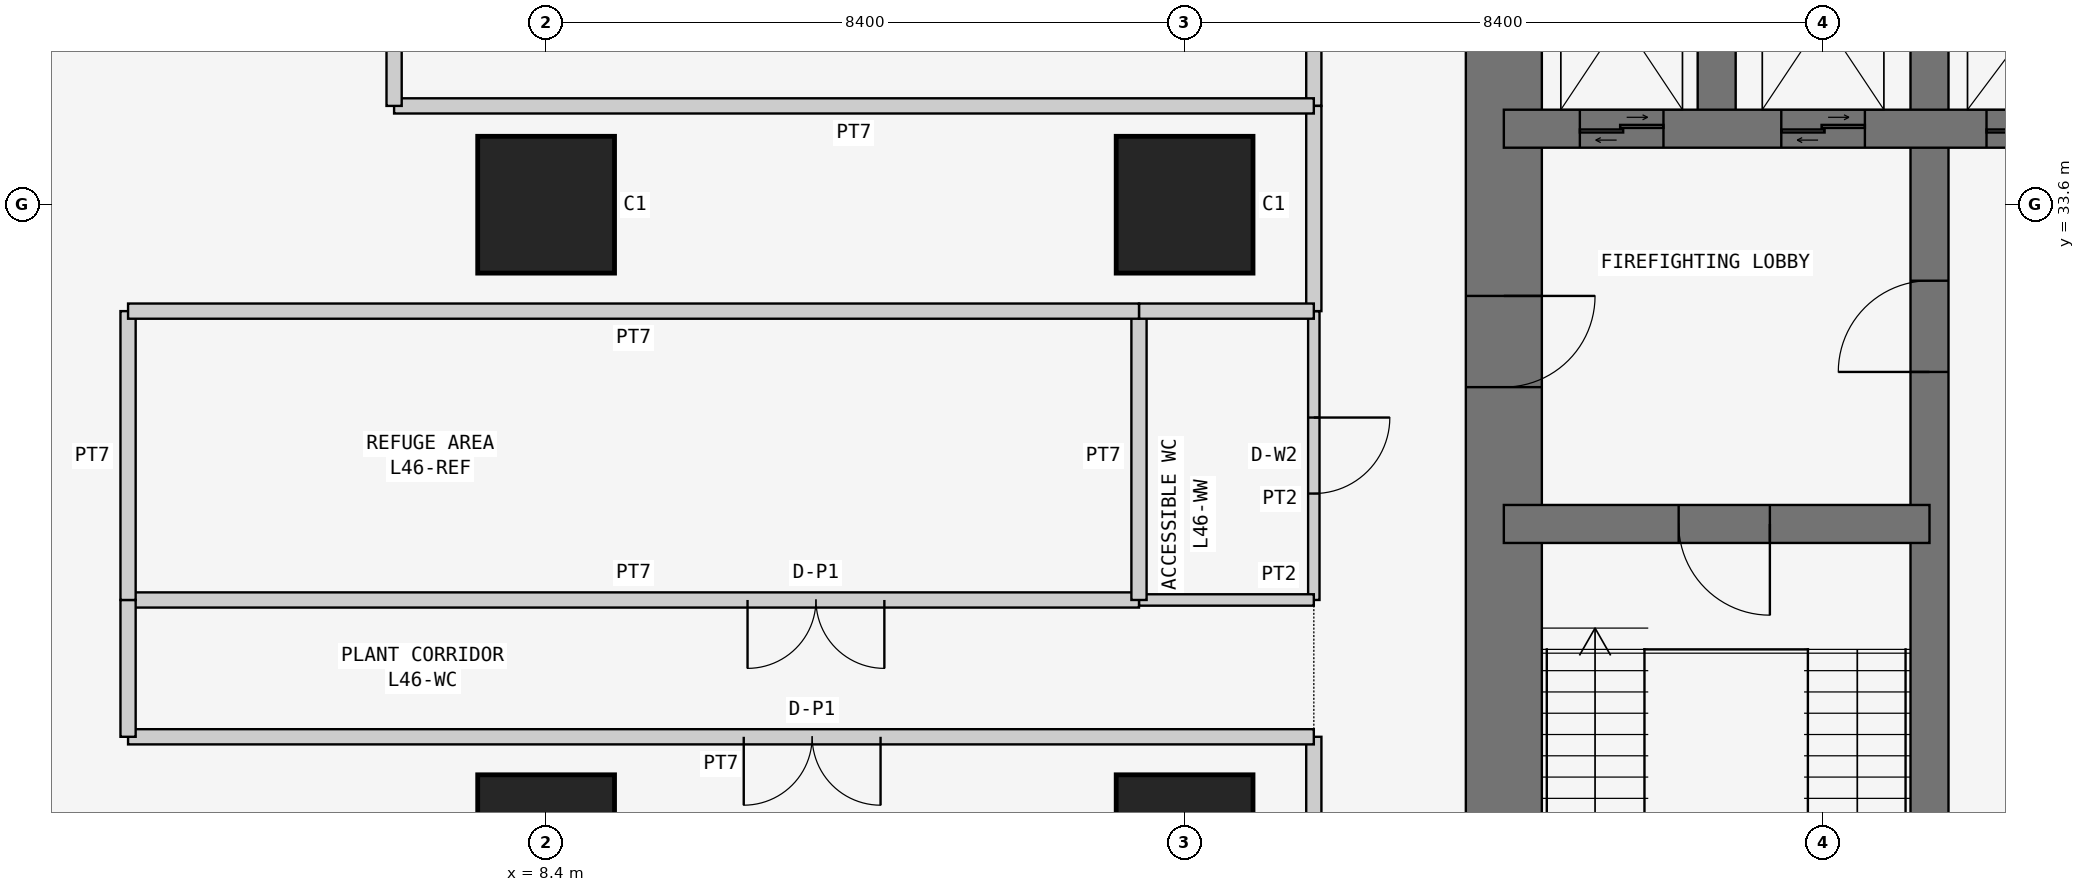
"""IFC4 building model, lengths in metres.
Left out: names, types, materials, properties, quantities, classifications, styles, units other than length and angle.
Written with IfcOpenShell. Run it as: python <this file> out.ifc"""

import sys

from ifc_helpers import new_model, si_unit, direction, frame, frame_2d, origin, origin_2d, place, context, subcontext, project, spatial, rectangle, extrude, element, fill, save


model = new_model("IFC4")
c1 = context("Model", 3, precision=1e-05, world=origin(), true_north=direction((0.0, 1.0)))
c2 = subcontext(c1, "Body", "Model", "MODEL_VIEW")
j1 = project(units=[si_unit("LENGTHUNIT", "METRE"), si_unit("PLANEANGLEUNIT", "RADIAN")], contexts=[c1])
p1 = place(None, origin())
s1 = spatial("IfcSite", under=j1, at=p1, CompositionType="ELEMENT")
p2 = place(p1, origin())
s2 = spatial("IfcBuilding", under=s1, at=p2, CompositionType="ELEMENT")
p3 = place(p2, frame((0.0, 0.0, 177.3)))
s3 = spatial("IfcBuildingStorey", under=s2, at=p3, CompositionType="ELEMENT", Elevation=177.3)
for number, where, z_axis, x_axis in (
    (1, (8.4, 25.2, 0.0), (0.0, 0.0, 1.0), (1.0, 0.0, 0.0)),
    (2, (8.4, 33.6, 0.0), (0.0, 0.0, 1.0), (1.0, 0.0, 0.0)),
    (3, (16.8, 25.2, 0.0), (0.0, 0.0, 1.0), (1.0, 0.0, 0.0)),
    (4, (16.8, 33.6, 0.0), (0.0, 0.0, 1.0), (1.0, 0.0, 0.0)),
):
    element("IfcColumn", number, at=place(p3, frame(where, z_axis=z_axis, x_axis=x_axis)), inside=s3, PredefinedType="COLUMN", context=c2, shape_type="SweptSolid", body=[
        extrude(rectangle(XDim=1.8, YDim=1.8, at=origin_2d()), origin(), (0.0, 0.0, 1.0), 6.0),
    ])
p4 = place(p3, frame((21.0, 37.8, 0.0), z_axis=(0.0, 0.0, 1.0), x_axis=(0.0, -1.0, 0.0)))
e5 = element("IfcWall", 5, at=p4, inside=s3, PredefinedType="SHEAR", context=c2, shape_type="SweptSolid", body=[
    extrude(rectangle(XDim=17.3, YDim=1.0, at=frame_2d((8.65, 0.0))), origin(), (0.0, 0.0, 1.0), 6.0),
])
p5 = place(p4, frame((5.4, 0.0, 0.0)))
e6 = element("IfcOpeningElement", 6, at=p5, cuts=e5, PredefinedType="OPENING", context=c2, shape_type="SweptSolid", body=[
    extrude(rectangle(XDim=1.2, YDim=2.1, at=frame_2d((0.6, 1.05))), frame((0.0, 0.51, 0.0), z_axis=(0.0, -1.0, 0.0), x_axis=(1.0, 0.0, 0.0)), (0.0, 0.0, 1.0), 1.02),
])
p6 = place(p3, frame((26.6, 21.0, 0.0), z_axis=(0.0, 0.0, 1.0), x_axis=(0.0, 1.0, 0.0)))
e7 = element("IfcWall", 7, at=p6, inside=s3, PredefinedType="SHEAR", context=c2, shape_type="SweptSolid", body=[
    extrude(rectangle(XDim=16.8, YDim=0.5, at=frame_2d((8.4, 0.0))), origin(), (0.0, 0.0, 1.0), 6.0),
])
p7 = place(p6, frame((10.4, 0.0, 0.0)))
e8 = element("IfcOpeningElement", 8, at=p7, cuts=e7, PredefinedType="OPENING", context=c2, shape_type="SweptSolid", body=[
    extrude(rectangle(XDim=1.2, YDim=2.1, at=frame_2d((0.6, 1.05))), frame((0.0, 0.26, 0.0), z_axis=(0.0, -1.0, 0.0), x_axis=(1.0, 0.0, 0.0)), (0.0, 0.0, 1.0), 0.52),
])
p8 = place(p3, frame((21.0, 29.4, 0.0), z_axis=(0.0, 0.0, 1.0), x_axis=(1.0, 0.0, 0.0)))
e9 = element("IfcWall", 9, at=p8, inside=s3, PredefinedType="SHEAR", context=c2, shape_type="SweptSolid", body=[
    extrude(rectangle(XDim=5.6, YDim=0.5, at=frame_2d((2.8, 0.0))), origin(), (0.0, 0.0, 1.0), 6.0),
])
p9 = place(p8, frame((2.3, 0.0, 0.0)))
e10 = element("IfcOpeningElement", 10, at=p9, cuts=e9, PredefinedType="OPENING", context=c2, shape_type="SweptSolid", body=[
    extrude(rectangle(XDim=1.2, YDim=2.1, at=frame_2d((0.6, 1.05))), frame((0.0, 0.26, 0.0), z_axis=(0.0, -1.0, 0.0), x_axis=(1.0, 0.0, 0.0)), (0.0, 0.0, 1.0), 0.52),
])
p10 = place(p3, frame((21.0, 34.6, 0.0), z_axis=(0.0, 0.0, 1.0), x_axis=(1.0, 0.0, 0.0)))
e11 = element("IfcWall", 11, at=p10, inside=s3, PredefinedType="SHEAR", context=c2, shape_type="SweptSolid", body=[
    extrude(rectangle(XDim=11.2, YDim=0.5, at=frame_2d((5.6, 0.0))), origin(), (0.0, 0.0, 1.0), 6.0),
])
p11 = place(p10, frame((1.0, 0.0, 0.0)))
e12 = element("IfcOpeningElement", 12, at=p11, cuts=e11, PredefinedType="OPENING", context=c2, shape_type="SweptSolid", body=[
    extrude(rectangle(XDim=1.1, YDim=2.1, at=frame_2d((0.55, 1.05))), frame((0.0, 0.26, 0.0), z_axis=(0.0, -1.0, 0.0), x_axis=(1.0, 0.0, 0.0)), (0.0, 0.0, 1.0), 0.52),
])
p12 = place(p10, frame((3.65, 0.0, 0.0)))
e13 = element("IfcOpeningElement", 13, at=p12, cuts=e11, PredefinedType="OPENING", context=c2, shape_type="SweptSolid", body=[
    extrude(rectangle(XDim=1.1, YDim=2.1, at=frame_2d((0.55, 1.05))), frame((0.0, 0.26, 0.0), z_axis=(0.0, -1.0, 0.0), x_axis=(1.0, 0.0, 0.0)), (0.0, 0.0, 1.0), 0.52),
])
p13 = place(p10, frame((6.35, 0.0, 0.0)))
e14 = element("IfcOpeningElement", 14, at=p13, cuts=e11, PredefinedType="OPENING", context=c2, shape_type="SweptSolid", body=[
    extrude(rectangle(XDim=1.3, YDim=2.1, at=frame_2d((0.65, 1.05))), frame((0.0, 0.26, 0.0), z_axis=(0.0, -1.0, 0.0), x_axis=(1.0, 0.0, 0.0)), (0.0, 0.0, 1.0), 0.52),
])
p14 = place(p3, frame((23.8, 34.6, 0.0), z_axis=(0.0, 0.0, 1.0), x_axis=(0.0, 1.0, 0.0)))
e15 = element("IfcWall", 15, at=p14, inside=s3, PredefinedType="SHEAR", context=c2, shape_type="SweptSolid", body=[
    extrude(rectangle(XDim=3.2, YDim=0.5, at=frame_2d((1.6, 0.0))), origin(), (0.0, 0.0, 1.0), 6.0),
])
p15 = place(p3, frame((18.5, 34.9, 0.0), z_axis=(0.0, 0.0, 1.0), x_axis=(0.0, 1.0, 0.0)))
e16 = element("IfcWall", 16, at=p15, inside=s3, PredefinedType="PARTITIONING", context=c2, shape_type="SweptSolid", body=[
    extrude(rectangle(XDim=5.4, YDim=0.2, at=frame_2d((2.7, 0.0))), origin(), (0.0, 0.0, 1.0), 5.85),
])
p16 = place(p15, frame((1.8, 0.0, 0.0)))
e17 = element("IfcOpeningElement", 17, at=p16, cuts=e16, PredefinedType="OPENING", context=c2, shape_type="SweptSolid", body=[
    extrude(rectangle(XDim=1.8, YDim=2.4, at=frame_2d((0.9, 1.2))), frame((0.0, 0.11, 0.0), z_axis=(0.0, -1.0, 0.0), x_axis=(1.0, 0.0, 0.0)), (0.0, 0.0, 1.0), 0.22),
])
p17 = place(p3, frame((18.5, 28.4, 0.0), z_axis=(0.0, 0.0, 1.0), x_axis=(0.0, 1.0, 0.0)))
e18 = element("IfcWall", 18, at=p17, inside=s3, PredefinedType="PARTITIONING", context=c2, shape_type="SweptSolid", body=[
    extrude(rectangle(XDim=3.8, YDim=0.15, at=frame_2d((1.9, 0.0))), origin(), (0.0, 0.0, 1.0), 5.85),
])
p18 = place(p17, frame((1.4, 0.0, 0.0)))
e19 = element("IfcOpeningElement", 19, at=p18, cuts=e18, PredefinedType="OPENING", context=c2, shape_type="SweptSolid", body=[
    extrude(rectangle(XDim=1.0, YDim=2.1, at=frame_2d((0.5, 1.05))), frame((0.0, 0.085, 0.0), z_axis=(0.0, -1.0, 0.0), x_axis=(1.0, 0.0, 0.0)), (0.0, 0.0, 1.0), 0.17),
])
p19 = place(p3, frame((18.5, 23.9, 0.0), z_axis=(0.0, 0.0, 1.0), x_axis=(0.0, 1.0, 0.0)))
e20 = element("IfcWall", 20, at=p19, inside=s3, PredefinedType="PARTITIONING", context=c2, shape_type="SweptSolid", body=[
    extrude(rectangle(XDim=2.7, YDim=0.2, at=frame_2d((1.35, 0.0))), origin(), (0.0, 0.0, 1.0), 5.85),
])
p20 = place(p3, frame((18.5, 32.2, 0.0), z_axis=(0.0, 0.0, 1.0), x_axis=(0.0, 1.0, 0.0)))
e21 = element("IfcWall", 21, at=p20, inside=s3, PredefinedType="PARTITIONING", context=c2, shape_type="SweptSolid", body=[
    extrude(rectangle(XDim=2.7, YDim=0.2, at=frame_2d((1.35, 0.0))), origin(), (0.0, 0.0, 1.0), 5.85),
])
p21 = place(p3, frame((18.5, 34.9, 0.0), z_axis=(0.0, 0.0, 1.0), x_axis=(-1.0, 0.0, 0.0)))
e22 = element("IfcWall", 22, at=p21, inside=s3, PredefinedType="PARTITIONING", context=c2, shape_type="SweptSolid", body=[
    extrude(rectangle(XDim=12.1, YDim=0.2, at=frame_2d((6.05, 0.0))), origin(), (0.0, 0.0, 1.0), 5.85),
])
p22 = place(p3, frame((6.4, 34.9, 0.0), z_axis=(0.0, 0.0, 1.0), x_axis=(0.0, 1.0, 0.0)))
e23 = element("IfcWall", 23, at=p22, inside=s3, PredefinedType="PARTITIONING", context=c2, shape_type="SweptSolid", body=[
    extrude(rectangle(XDim=7.8, YDim=0.2, at=frame_2d((3.9, 0.0))), origin(), (0.0, 0.0, 1.0), 5.85),
])
p23 = place(p3, frame((16.2, 28.4, 0.0), z_axis=(0.0, 0.0, 1.0), x_axis=(1.0, 0.0, 0.0)))
e24 = element("IfcWall", 24, at=p23, inside=s3, PredefinedType="PARTITIONING", context=c2, shape_type="SweptSolid", body=[
    extrude(rectangle(XDim=2.3, YDim=0.15, at=frame_2d((1.15, 0.0))), origin(), (0.0, 0.0, 1.0), 5.85),
])
p24 = place(p3, frame((2.9, 28.4, 0.0), z_axis=(0.0, 0.0, 1.0), x_axis=(1.0, 0.0, 0.0)))
e25 = element("IfcWall", 25, at=p24, inside=s3, PredefinedType="PARTITIONING", context=c2, shape_type="SweptSolid", body=[
    extrude(rectangle(XDim=13.3, YDim=0.2, at=frame_2d((6.65, 0.0))), origin(), (0.0, 0.0, 1.0), 5.85),
])
p25 = place(p24, frame((8.15, 0.0, 0.0)))
e26 = element("IfcOpeningElement", 26, at=p25, cuts=e25, PredefinedType="OPENING", context=c2, shape_type="SweptSolid", body=[
    extrude(rectangle(XDim=1.8, YDim=2.4, at=frame_2d((0.9, 1.2))), frame((0.0, 0.11, 0.0), z_axis=(0.0, -1.0, 0.0), x_axis=(1.0, 0.0, 0.0)), (0.0, 0.0, 1.0), 0.22),
])
p26 = place(p3, frame((18.5, 26.6, 0.0), z_axis=(0.0, 0.0, 1.0), x_axis=(-1.0, 0.0, 0.0)))
e27 = element("IfcWall", 27, at=p26, inside=s3, PredefinedType="PARTITIONING", context=c2, shape_type="SweptSolid", body=[
    extrude(rectangle(XDim=15.6, YDim=0.2, at=frame_2d((7.8, 0.0))), origin(), (0.0, 0.0, 1.0), 5.85),
])
p27 = place(p26, frame((5.7, 0.0, 0.0)))
e28 = element("IfcOpeningElement", 28, at=p27, cuts=e27, PredefinedType="OPENING", context=c2, shape_type="SweptSolid", body=[
    extrude(rectangle(XDim=1.8, YDim=2.4, at=frame_2d((0.9, 1.2))), frame((0.0, 0.11, 0.0), z_axis=(0.0, -1.0, 0.0), x_axis=(1.0, 0.0, 0.0)), (0.0, 0.0, 1.0), 0.22),
])
p28 = place(p3, frame((2.9, 26.6, 0.0), z_axis=(0.0, 0.0, 1.0), x_axis=(0.0, 1.0, 0.0)))
e29 = element("IfcWall", 29, at=p28, inside=s3, PredefinedType="PARTITIONING", context=c2, shape_type="SweptSolid", body=[
    extrude(rectangle(XDim=1.8, YDim=0.2, at=frame_2d((0.9, 0.0))), origin(), (0.0, 0.0, 1.0), 5.85),
])
p29 = place(p3, frame((16.2, 28.4, 0.0), z_axis=(0.0, 0.0, 1.0), x_axis=(0.0, 1.0, 0.0)))
e30 = element("IfcWall", 30, at=p29, inside=s3, PredefinedType="PARTITIONING", context=c2, shape_type="SweptSolid", body=[
    extrude(rectangle(XDim=3.8, YDim=0.2, at=frame_2d((1.9, 0.0))), origin(), (0.0, 0.0, 1.0), 5.85),
])
p30 = place(p3, frame((16.2, 32.2, 0.0), z_axis=(0.0, 0.0, 1.0), x_axis=(1.0, 0.0, 0.0)))
e31 = element("IfcWall", 31, at=p30, inside=s3, PredefinedType="PARTITIONING", context=c2, shape_type="SweptSolid", body=[
    extrude(rectangle(XDim=2.3, YDim=0.2, at=frame_2d((1.15, 0.0))), origin(), (0.0, 0.0, 1.0), 5.85),
])
p31 = place(p3, frame((2.9, 28.4, 0.0), z_axis=(0.0, 0.0, 1.0), x_axis=(0.0, 1.0, 0.0)))
e32 = element("IfcWall", 32, at=p31, inside=s3, PredefinedType="PARTITIONING", context=c2, shape_type="SweptSolid", body=[
    extrude(rectangle(XDim=3.8, YDim=0.2, at=frame_2d((1.9, 0.0))), origin(), (0.0, 0.0, 1.0), 5.85),
])
p32 = place(p3, frame((2.9, 32.2, 0.0), z_axis=(0.0, 0.0, 1.0), x_axis=(1.0, 0.0, 0.0)))
e33 = element("IfcWall", 33, at=p32, inside=s3, PredefinedType="PARTITIONING", context=c2, shape_type="SweptSolid", body=[
    extrude(rectangle(XDim=13.3, YDim=0.2, at=frame_2d((6.65, 0.0))), origin(), (0.0, 0.0, 1.0), 5.85),
])
p33 = place(p18, frame((1.0, 0.0, 0.0), z_axis=(0.0, 0.0, 1.0), x_axis=(-1.0, 0.0, 0.0)))
e34 = element("IfcDoor", 34, at=p33, inside=s3, OperationType="SINGLE_SWING_LEFT", PredefinedType="DOOR", context=c2, shape_type="SweptSolid", body=[
    extrude(rectangle(XDim=1.0, YDim=2.1, at=frame_2d((0.5, 1.05))), frame((0.0, 0.025, 0.0), z_axis=(0.0, -1.0, 0.0), x_axis=(1.0, 0.0, 0.0)), (0.0, 0.0, 1.0), 0.05),
])
fill(e19, e34)
p34 = place(p25, frame((1.8, 0.0, 0.0), z_axis=(0.0, 0.0, 1.0), x_axis=(-1.0, 0.0, 0.0)))
e35 = element("IfcDoor", 35, at=p34, inside=s3, OperationType="DOUBLE_DOOR_SINGLE_SWING", PredefinedType="DOOR", context=c2, shape_type="SweptSolid", body=[
    extrude(rectangle(XDim=1.8, YDim=2.4, at=frame_2d((0.9, 1.2))), frame((0.0, 0.025, 0.0), z_axis=(0.0, -1.0, 0.0), x_axis=(1.0, 0.0, 0.0)), (0.0, 0.0, 1.0), 0.05),
])
fill(e26, e35)
p35 = place(p27, origin())
e36 = element("IfcDoor", 36, at=p35, inside=s3, OperationType="DOUBLE_DOOR_SINGLE_SWING", PredefinedType="DOOR", context=c2, shape_type="SweptSolid", body=[
    extrude(rectangle(XDim=1.8, YDim=2.4, at=frame_2d((0.9, 1.2))), frame((0.0, 0.025, 0.0), z_axis=(0.0, -1.0, 0.0), x_axis=(1.0, 0.0, 0.0)), (0.0, 0.0, 1.0), 0.05),
])
fill(e28, e36)
p36 = place(p5, origin())
e37 = element("IfcDoor", 37, at=p36, inside=s3, OperationType="SINGLE_SWING_LEFT", PredefinedType="DOOR", context=c2, shape_type="SweptSolid", body=[
    extrude(rectangle(XDim=1.2, YDim=2.1, at=frame_2d((0.6, 1.05))), frame((0.0, 0.025, 0.0), z_axis=(0.0, -1.0, 0.0), x_axis=(1.0, 0.0, 0.0)), (0.0, 0.0, 1.0), 0.05),
])
fill(e6, e37)
p37 = place(p9, frame((1.2, 0.0, 0.0), z_axis=(0.0, 0.0, 1.0), x_axis=(-1.0, 0.0, 0.0)))
e38 = element("IfcDoor", 38, at=p37, inside=s3, OperationType="SINGLE_SWING_LEFT", PredefinedType="DOOR", context=c2, shape_type="SweptSolid", body=[
    extrude(rectangle(XDim=1.2, YDim=2.1, at=frame_2d((0.6, 1.05))), frame((0.0, 0.025, 0.0), z_axis=(0.0, -1.0, 0.0), x_axis=(1.0, 0.0, 0.0)), (0.0, 0.0, 1.0), 0.05),
])
fill(e10, e38)
p38 = place(p7, origin())
e39 = element("IfcDoor", 39, at=p38, inside=s3, OperationType="SINGLE_SWING_LEFT", PredefinedType="DOOR", context=c2, shape_type="SweptSolid", body=[
    extrude(rectangle(XDim=1.2, YDim=2.1, at=frame_2d((0.6, 1.05))), frame((0.0, 0.025, 0.0), z_axis=(0.0, -1.0, 0.0), x_axis=(1.0, 0.0, 0.0)), (0.0, 0.0, 1.0), 0.05),
])
fill(e8, e39)
p39 = place(p11, origin())
e40 = element("IfcDoor", 40, at=p39, inside=s3, OperationType="DOUBLE_DOOR_SLIDING", PredefinedType="DOOR", context=c2, shape_type="SweptSolid", body=[
    extrude(rectangle(XDim=1.1, YDim=2.1, at=frame_2d((0.55, 1.05))), frame((0.0, 0.025, 0.0), z_axis=(0.0, -1.0, 0.0), x_axis=(1.0, 0.0, 0.0)), (0.0, 0.0, 1.0), 0.05),
])
fill(e12, e40)
p40 = place(p12, origin())
e41 = element("IfcDoor", 41, at=p40, inside=s3, OperationType="DOUBLE_DOOR_SLIDING", PredefinedType="DOOR", context=c2, shape_type="SweptSolid", body=[
    extrude(rectangle(XDim=1.1, YDim=2.1, at=frame_2d((0.55, 1.05))), frame((0.0, 0.025, 0.0), z_axis=(0.0, -1.0, 0.0), x_axis=(1.0, 0.0, 0.0)), (0.0, 0.0, 1.0), 0.05),
])
fill(e13, e41)
p41 = place(p13, origin())
e42 = element("IfcDoor", 42, at=p41, inside=s3, OperationType="DOUBLE_DOOR_SLIDING", PredefinedType="DOOR", context=c2, shape_type="SweptSolid", body=[
    extrude(rectangle(XDim=1.3, YDim=2.1, at=frame_2d((0.65, 1.05))), frame((0.0, 0.025, 0.0), z_axis=(0.0, -1.0, 0.0), x_axis=(1.0, 0.0, 0.0)), (0.0, 0.0, 1.0), 0.05),
])
fill(e14, e42)
save(model, sys.argv[1])
